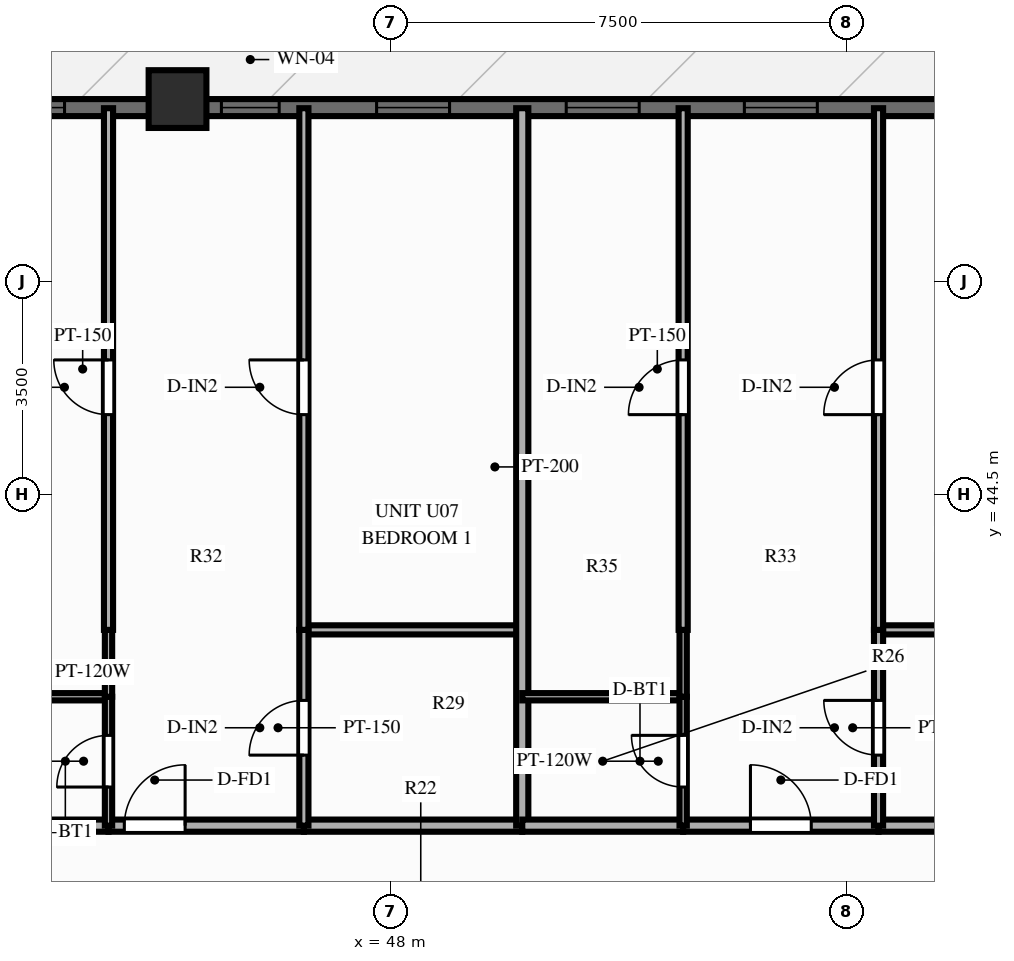
"""IFC4 building model, lengths in metres.
Left out: names, types, materials, properties, quantities, classifications, styles, units other than length and angle.
Written with IfcOpenShell. Run it as: python <this file> out.ifc"""

import sys

from ifc_helpers import new_model, si_unit, direction, frame, frame_2d, origin, origin_2d, place, context, subcontext, project, spatial, rectangle, extrude, source, transform, mapped, element, fill, save


model = new_model("IFC4")
c1 = context("Model", 3, precision=1e-05, world=origin(), true_north=direction((0.0, 1.0)))
c2 = subcontext(c1, "Body", "Model", "MODEL_VIEW")
j1 = project(units=[si_unit("LENGTHUNIT", "METRE"), si_unit("PLANEANGLEUNIT", "RADIAN")], contexts=[c1])
p1 = place(None, origin())
s1 = spatial("IfcSite", under=j1, at=p1, CompositionType="ELEMENT")
p2 = place(p1, origin())
s2 = spatial("IfcBuilding", under=s1, at=p2, CompositionType="ELEMENT")
p3 = place(p2, frame((0.0, 0.0, 86.85)))
s3 = spatial("IfcBuildingStorey", under=s2, at=p3, CompositionType="ELEMENT", Elevation=86.85)
m1 = source(origin(), c2, "Body", "SweptSolid", [
    extrude(rectangle(XDim=0.95, YDim=0.95, at=origin_2d()), origin(), (0.0, 0.0, 1.0), 3.0),
])
p4 = place(p3, frame((44.5, 51.0, 0.0), z_axis=(0.0, 0.0, 1.0), x_axis=(1.0, 0.0, 0.0)))
e1 = element("IfcColumn", 1, at=p4, inside=s3, PredefinedType="COLUMN", context=c2, shape_type="MappedRepresentation", body=[
    mapped(m1, transform((0.0, 0.0, 0.0), scale=1.0)),
])
p5 = place(p3, frame((16.2, 50.86, 0.0), z_axis=(0.0, 0.0, 1.0), x_axis=(1.0, 0.0, 0.0)))
e2 = element("IfcWall", 2, at=p5, inside=s3, PredefinedType="SOLIDWALL", context=c2, shape_type="SweptSolid", body=[
    extrude(rectangle(XDim=43.6, YDim=0.28, at=frame_2d((21.8, 0.0))), origin(), (0.0, 0.0, 1.0), 2.28),
])
p6 = place(p5, frame((0.722, 0.0, 0.25)))
e3 = element("IfcOpeningElement", 3, at=p6, cuts=e2, PredefinedType="OPENING", context=c2, shape_type="SweptSolid", body=[
    extrude(rectangle(XDim=1.2, YDim=1.5, at=frame_2d((0.6, 0.75))), frame((0.0, 0.152, 0.0), z_axis=(0.0, -1.0, 0.0), x_axis=(1.0, 0.0, 0.0)), (0.0, 0.0, 1.0), 0.304),
])
p7 = place(p5, frame((3.172, 0.0, 0.25)))
e4 = element("IfcOpeningElement", 4, at=p7, cuts=e2, PredefinedType="OPENING", context=c2, shape_type="SweptSolid", body=[
    extrude(rectangle(XDim=1.2, YDim=1.5, at=frame_2d((0.6, 0.75))), frame((0.0, 0.152, 0.0), z_axis=(0.0, -1.0, 0.0), x_axis=(1.0, 0.0, 0.0)), (0.0, 0.0, 1.0), 0.304),
])
p8 = place(p5, frame((6.944, 0.0, 0.25)))
e5 = element("IfcOpeningElement", 5, at=p8, cuts=e2, PredefinedType="OPENING", context=c2, shape_type="SweptSolid", body=[
    extrude(rectangle(XDim=1.2, YDim=1.5, at=frame_2d((0.6, 0.75))), frame((0.0, 0.152, 0.0), z_axis=(0.0, -1.0, 0.0), x_axis=(1.0, 0.0, 0.0)), (0.0, 0.0, 1.0), 0.304),
])
p9 = place(p5, frame((11.049, 0.0, 0.25)))
e6 = element("IfcOpeningElement", 6, at=p9, cuts=e2, PredefinedType="OPENING", context=c2, shape_type="SweptSolid", body=[
    extrude(rectangle(XDim=1.2, YDim=1.5, at=frame_2d((0.6, 0.75))), frame((0.0, 0.152, 0.0), z_axis=(0.0, -1.0, 0.0), x_axis=(1.0, 0.0, 0.0)), (0.0, 0.0, 1.0), 0.304),
])
p10 = place(p5, frame((13.73, 0.0, 0.25)))
e7 = element("IfcOpeningElement", 7, at=p10, cuts=e2, PredefinedType="OPENING", context=c2, shape_type="SweptSolid", body=[
    extrude(rectangle(XDim=0.95, YDim=1.5, at=frame_2d((0.475, 0.75))), frame((0.0, 0.152, 0.0), z_axis=(0.0, -1.0, 0.0), x_axis=(1.0, 0.0, 0.0)), (0.0, 0.0, 1.0), 0.304),
])
p11 = place(p5, frame((18.089, 0.0, 0.0)))
e8 = element("IfcOpeningElement", 8, at=p11, cuts=e2, PredefinedType="OPENING", context=c2, shape_type="SweptSolid", body=[
    extrude(rectangle(XDim=1.1, YDim=2.15, at=frame_2d((0.55, 1.075))), frame((0.0, 0.152, 0.0), z_axis=(0.0, -1.0, 0.0), x_axis=(1.0, 0.0, 0.0)), (0.0, 0.0, 1.0), 0.304),
])
p12 = place(p5, frame((22.144, 0.0, 0.25)))
e9 = element("IfcOpeningElement", 9, at=p12, cuts=e2, PredefinedType="OPENING", context=c2, shape_type="SweptSolid", body=[
    extrude(rectangle(XDim=1.2, YDim=1.5, at=frame_2d((0.6, 0.75))), frame((0.0, 0.152, 0.0), z_axis=(0.0, -1.0, 0.0), x_axis=(1.0, 0.0, 0.0)), (0.0, 0.0, 1.0), 0.304),
])
p13 = place(p5, frame((25.242, 0.0, 0.25)))
e10 = element("IfcOpeningElement", 10, at=p13, cuts=e2, PredefinedType="OPENING", context=c2, shape_type="SweptSolid", body=[
    extrude(rectangle(XDim=1.2, YDim=1.5, at=frame_2d((0.6, 0.75))), frame((0.0, 0.152, 0.0), z_axis=(0.0, -1.0, 0.0), x_axis=(1.0, 0.0, 0.0)), (0.0, 0.0, 1.0), 0.304),
])
p14 = place(p5, frame((29.021, 0.0, 0.25)))
e11 = element("IfcOpeningElement", 11, at=p14, cuts=e2, PredefinedType="OPENING", context=c2, shape_type="SweptSolid", body=[
    extrude(rectangle(XDim=0.95, YDim=1.5, at=frame_2d((0.475, 0.75))), frame((0.0, 0.152, 0.0), z_axis=(0.0, -1.0, 0.0), x_axis=(1.0, 0.0, 0.0)), (0.0, 0.0, 1.0), 0.304),
])
p15 = place(p5, frame((31.574, 0.0, 0.25)))
e12 = element("IfcOpeningElement", 12, at=p15, cuts=e2, PredefinedType="OPENING", context=c2, shape_type="SweptSolid", body=[
    extrude(rectangle(XDim=1.2, YDim=1.5, at=frame_2d((0.6, 0.75))), frame((0.0, 0.152, 0.0), z_axis=(0.0, -1.0, 0.0), x_axis=(1.0, 0.0, 0.0)), (0.0, 0.0, 1.0), 0.304),
])
p16 = place(p5, frame((34.692, 0.0, 0.25)))
e13 = element("IfcOpeningElement", 13, at=p16, cuts=e2, PredefinedType="OPENING", context=c2, shape_type="SweptSolid", body=[
    extrude(rectangle(XDim=1.2, YDim=1.5, at=frame_2d((0.6, 0.75))), frame((0.0, 0.152, 0.0), z_axis=(0.0, -1.0, 0.0), x_axis=(1.0, 0.0, 0.0)), (0.0, 0.0, 1.0), 0.304),
])
p17 = place(p5, frame((37.622, 0.0, 0.25)))
e14 = element("IfcOpeningElement", 14, at=p17, cuts=e2, PredefinedType="OPENING", context=c2, shape_type="SweptSolid", body=[
    extrude(rectangle(XDim=1.2, YDim=1.5, at=frame_2d((0.6, 0.75))), frame((0.0, 0.152, 0.0), z_axis=(0.0, -1.0, 0.0), x_axis=(1.0, 0.0, 0.0)), (0.0, 0.0, 1.0), 0.304),
])
p18 = place(p5, frame((40.957, 0.0, 0.25)))
e15 = element("IfcOpeningElement", 15, at=p18, cuts=e2, PredefinedType="OPENING", context=c2, shape_type="SweptSolid", body=[
    extrude(rectangle(XDim=1.2, YDim=1.5, at=frame_2d((0.6, 0.75))), frame((0.0, 0.152, 0.0), z_axis=(0.0, -1.0, 0.0), x_axis=(1.0, 0.0, 0.0)), (0.0, 0.0, 1.0), 0.304),
])
p19 = place(p3, frame((40.719, 39.05, 0.0), z_axis=(0.0, 0.0, 1.0), x_axis=(1.0, 0.0, 0.0)))
e16 = element("IfcWall", 16, at=p19, inside=s3, PredefinedType="PARTITIONING", context=c2, shape_type="SweptSolid", body=[
    extrude(rectangle(XDim=2.646, YDim=0.2, at=frame_2d((1.323, 0.0))), origin(), (0.0, 0.0, 1.0), 2.79),
])
p20 = place(p3, frame((43.365, 39.05, 0.0), z_axis=(0.0, 0.0, 1.0), x_axis=(1.0, 0.0, 0.0)))
e17 = element("IfcWall", 17, at=p20, inside=s3, PredefinedType="PARTITIONING", context=c2, shape_type="SweptSolid", body=[
    extrude(rectangle(XDim=3.213, YDim=0.2, at=frame_2d((1.606, 0.0))), origin(), (0.0, 0.0, 1.0), 2.79),
])
p21 = place(p20, frame((0.26, 0.0, 0.0)))
e18 = element("IfcOpeningElement", 18, at=p21, cuts=e17, PredefinedType="OPENING", context=c2, shape_type="SweptSolid", body=[
    extrude(rectangle(XDim=1.0, YDim=2.15, at=frame_2d((0.5, 1.075))), frame((0.0, 0.112, 0.0), z_axis=(0.0, -1.0, 0.0), x_axis=(1.0, 0.0, 0.0)), (0.0, 0.0, 1.0), 0.224),
])
p22 = place(p3, frame((46.578, 39.05, 0.0), z_axis=(0.0, 0.0, 1.0), x_axis=(1.0, 0.0, 0.0)))
e19 = element("IfcWall", 19, at=p22, inside=s3, PredefinedType="PARTITIONING", context=c2, shape_type="SweptSolid", body=[
    extrude(rectangle(XDim=3.591, YDim=0.2, at=frame_2d((1.796, 0.0))), origin(), (0.0, 0.0, 1.0), 2.79),
])
p23 = place(p3, frame((40.719, 41.17, 0.0), z_axis=(0.0, 0.0, 1.0), x_axis=(1.0, 0.0, 0.0)))
e20 = element("IfcWall", 20, at=p23, inside=s3, PredefinedType="PARTITIONING", context=c2, shape_type="SweptSolid", body=[
    extrude(rectangle(XDim=2.646, YDim=0.12, at=frame_2d((1.323, 0.0))), origin(), (0.0, 0.0, 1.0), 2.79),
])
p24 = place(p3, frame((46.578, 42.27, 0.0), z_axis=(0.0, 0.0, 1.0), x_axis=(1.0, 0.0, 0.0)))
e21 = element("IfcWall", 21, at=p24, inside=s3, PredefinedType="PARTITIONING", context=c2, shape_type="SweptSolid", body=[
    extrude(rectangle(XDim=3.591, YDim=0.15, at=frame_2d((1.796, 0.0))), origin(), (0.0, 0.0, 1.0), 2.79),
])
p25 = place(p3, frame((43.365, 39.05, 0.0), z_axis=(0.0, 0.0, 1.0), x_axis=(0.0, 1.0, 0.0)))
e22 = element("IfcWall", 22, at=p25, inside=s3, PredefinedType="PARTITIONING", context=c2, shape_type="SweptSolid", body=[
    extrude(rectangle(XDim=2.12, YDim=0.12, at=frame_2d((1.06, 0.0))), origin(), (0.0, 0.0, 1.0), 2.79),
])
p26 = place(p25, frame((0.635, 0.0, 0.0)))
e23 = element("IfcOpeningElement", 23, at=p26, cuts=e22, PredefinedType="OPENING", context=c2, shape_type="SweptSolid", body=[
    extrude(rectangle(XDim=0.85, YDim=2.05, at=frame_2d((0.425, 1.025))), frame((0.0, 0.072, 0.0), z_axis=(0.0, -1.0, 0.0), x_axis=(1.0, 0.0, 0.0)), (0.0, 0.0, 1.0), 0.144),
])
p27 = place(p3, frame((43.365, 41.17, 0.0), z_axis=(0.0, 0.0, 1.0), x_axis=(0.0, 1.0, 0.0)))
e24 = element("IfcWall", 24, at=p27, inside=s3, PredefinedType="PARTITIONING", context=c2, shape_type="SweptSolid", body=[
    extrude(rectangle(XDim=1.1, YDim=0.12, at=frame_2d((0.55, 0.0))), origin(), (0.0, 0.0, 1.0), 2.79),
])
p28 = place(p3, frame((43.365, 42.27, 0.0), z_axis=(0.0, 0.0, 1.0), x_axis=(0.0, 1.0, 0.0)))
e25 = element("IfcWall", 25, at=p28, inside=s3, PredefinedType="PARTITIONING", context=c2, shape_type="SweptSolid", body=[
    extrude(rectangle(XDim=8.58, YDim=0.15, at=frame_2d((4.29, 0.0))), origin(), (0.0, 0.0, 1.0), 2.79),
])
p29 = place(p28, frame((3.54, 0.0, 0.0)))
e26 = element("IfcOpeningElement", 26, at=p29, cuts=e25, PredefinedType="OPENING", context=c2, shape_type="SweptSolid", body=[
    extrude(rectangle(XDim=0.9, YDim=2.1, at=frame_2d((0.45, 1.05))), frame((0.0, 0.087, 0.0), z_axis=(0.0, -1.0, 0.0), x_axis=(1.0, 0.0, 0.0)), (0.0, 0.0, 1.0), 0.174),
])
p30 = place(p3, frame((46.578, 39.05, 0.0), z_axis=(0.0, 0.0, 1.0), x_axis=(0.0, 1.0, 0.0)))
e27 = element("IfcWall", 27, at=p30, inside=s3, PredefinedType="PARTITIONING", context=c2, shape_type="SweptSolid", body=[
    extrude(rectangle(XDim=3.22, YDim=0.15, at=frame_2d((1.61, 0.0))), origin(), (0.0, 0.0, 1.0), 2.79),
])
p31 = place(p30, frame((1.16, 0.0, 0.0)))
e28 = element("IfcOpeningElement", 28, at=p31, cuts=e27, PredefinedType="OPENING", context=c2, shape_type="SweptSolid", body=[
    extrude(rectangle(XDim=0.9, YDim=2.1, at=frame_2d((0.45, 1.05))), frame((0.0, 0.087, 0.0), z_axis=(0.0, -1.0, 0.0), x_axis=(1.0, 0.0, 0.0)), (0.0, 0.0, 1.0), 0.174),
])
p32 = place(p3, frame((46.578, 42.27, 0.0), z_axis=(0.0, 0.0, 1.0), x_axis=(0.0, 1.0, 0.0)))
e29 = element("IfcWall", 29, at=p32, inside=s3, PredefinedType="PARTITIONING", context=c2, shape_type="SweptSolid", body=[
    extrude(rectangle(XDim=8.58, YDim=0.15, at=frame_2d((4.29, 0.0))), origin(), (0.0, 0.0, 1.0), 2.79),
])
p33 = place(p32, frame((3.54, 0.0, 0.0)))
e30 = element("IfcOpeningElement", 30, at=p33, cuts=e29, PredefinedType="OPENING", context=c2, shape_type="SweptSolid", body=[
    extrude(rectangle(XDim=0.9, YDim=2.1, at=frame_2d((0.45, 1.05))), frame((0.0, 0.087, 0.0), z_axis=(0.0, -1.0, 0.0), x_axis=(1.0, 0.0, 0.0)), (0.0, 0.0, 1.0), 0.174),
])
p34 = place(p3, frame((50.169, 39.05, 0.0), z_axis=(0.0, 0.0, 1.0), x_axis=(0.0, 1.0, 0.0)))
e31 = element("IfcWall", 31, at=p34, inside=s3, PredefinedType="PARTITIONING", context=c2, shape_type="SweptSolid", body=[
    extrude(rectangle(XDim=11.8, YDim=0.2, at=frame_2d((5.9, 0.0))), origin(), (0.0, 0.0, 1.0), 2.79),
])
p35 = place(p3, frame((50.169, 39.05, 0.0), z_axis=(0.0, 0.0, 1.0), x_axis=(1.0, 0.0, 0.0)))
e32 = element("IfcWall", 32, at=p35, inside=s3, PredefinedType="PARTITIONING", context=c2, shape_type="SweptSolid", body=[
    extrude(rectangle(XDim=2.646, YDim=0.2, at=frame_2d((1.323, 0.0))), origin(), (0.0, 0.0, 1.0), 2.79),
])
p36 = place(p3, frame((52.815, 39.05, 0.0), z_axis=(0.0, 0.0, 1.0), x_axis=(1.0, 0.0, 0.0)))
e33 = element("IfcWall", 33, at=p36, inside=s3, PredefinedType="PARTITIONING", context=c2, shape_type="SweptSolid", body=[
    extrude(rectangle(XDim=3.213, YDim=0.2, at=frame_2d((1.607, 0.0))), origin(), (0.0, 0.0, 1.0), 2.79),
])
p37 = place(p36, frame((1.107, 0.0, 0.0)))
e34 = element("IfcOpeningElement", 34, at=p37, cuts=e33, PredefinedType="OPENING", context=c2, shape_type="SweptSolid", body=[
    extrude(rectangle(XDim=1.0, YDim=2.15, at=frame_2d((0.5, 1.075))), frame((0.0, 0.112, 0.0), z_axis=(0.0, -1.0, 0.0), x_axis=(1.0, 0.0, 0.0)), (0.0, 0.0, 1.0), 0.224),
])
p38 = place(p3, frame((56.029, 39.05, 0.0), z_axis=(0.0, 0.0, 1.0), x_axis=(1.0, 0.0, 0.0)))
e35 = element("IfcWall", 35, at=p38, inside=s3, PredefinedType="PARTITIONING", context=c2, shape_type="SweptSolid", body=[
    extrude(rectangle(XDim=3.591, YDim=0.2, at=frame_2d((1.796, 0.0))), origin(), (0.0, 0.0, 1.0), 2.79),
])
p39 = place(p3, frame((50.169, 41.17, 0.0), z_axis=(0.0, 0.0, 1.0), x_axis=(1.0, 0.0, 0.0)))
e36 = element("IfcWall", 36, at=p39, inside=s3, PredefinedType="PARTITIONING", context=c2, shape_type="SweptSolid", body=[
    extrude(rectangle(XDim=2.646, YDim=0.12, at=frame_2d((1.323, 0.0))), origin(), (0.0, 0.0, 1.0), 2.79),
])
p40 = place(p3, frame((56.029, 42.27, 0.0), z_axis=(0.0, 0.0, 1.0), x_axis=(1.0, 0.0, 0.0)))
e37 = element("IfcWall", 37, at=p40, inside=s3, PredefinedType="PARTITIONING", context=c2, shape_type="SweptSolid", body=[
    extrude(rectangle(XDim=3.591, YDim=0.15, at=frame_2d((1.796, 0.0))), origin(), (0.0, 0.0, 1.0), 2.79),
])
p41 = place(p3, frame((52.815, 39.05, 0.0), z_axis=(0.0, 0.0, 1.0), x_axis=(0.0, 1.0, 0.0)))
e38 = element("IfcWall", 38, at=p41, inside=s3, PredefinedType="PARTITIONING", context=c2, shape_type="SweptSolid", body=[
    extrude(rectangle(XDim=2.12, YDim=0.12, at=frame_2d((1.06, 0.0))), origin(), (0.0, 0.0, 1.0), 2.79),
])
p42 = place(p41, frame((0.635, 0.0, 0.0)))
e39 = element("IfcOpeningElement", 39, at=p42, cuts=e38, PredefinedType="OPENING", context=c2, shape_type="SweptSolid", body=[
    extrude(rectangle(XDim=0.85, YDim=2.05, at=frame_2d((0.425, 1.025))), frame((0.0, 0.072, 0.0), z_axis=(0.0, -1.0, 0.0), x_axis=(1.0, 0.0, 0.0)), (0.0, 0.0, 1.0), 0.144),
])
p43 = place(p3, frame((52.815, 41.17, 0.0), z_axis=(0.0, 0.0, 1.0), x_axis=(0.0, 1.0, 0.0)))
e40 = element("IfcWall", 40, at=p43, inside=s3, PredefinedType="PARTITIONING", context=c2, shape_type="SweptSolid", body=[
    extrude(rectangle(XDim=1.1, YDim=0.12, at=frame_2d((0.55, 0.0))), origin(), (0.0, 0.0, 1.0), 2.79),
])
p44 = place(p3, frame((52.815, 42.27, 0.0), z_axis=(0.0, 0.0, 1.0), x_axis=(0.0, 1.0, 0.0)))
e41 = element("IfcWall", 41, at=p44, inside=s3, PredefinedType="PARTITIONING", context=c2, shape_type="SweptSolid", body=[
    extrude(rectangle(XDim=8.58, YDim=0.15, at=frame_2d((4.29, 0.0))), origin(), (0.0, 0.0, 1.0), 2.79),
])
p45 = place(p44, frame((3.54, 0.0, 0.0)))
e42 = element("IfcOpeningElement", 42, at=p45, cuts=e41, PredefinedType="OPENING", context=c2, shape_type="SweptSolid", body=[
    extrude(rectangle(XDim=0.9, YDim=2.1, at=frame_2d((0.45, 1.05))), frame((0.0, 0.087, 0.0), z_axis=(0.0, -1.0, 0.0), x_axis=(1.0, 0.0, 0.0)), (0.0, 0.0, 1.0), 0.174),
])
p46 = place(p3, frame((56.029, 39.05, 0.0), z_axis=(0.0, 0.0, 1.0), x_axis=(0.0, 1.0, 0.0)))
e43 = element("IfcWall", 43, at=p46, inside=s3, PredefinedType="PARTITIONING", context=c2, shape_type="SweptSolid", body=[
    extrude(rectangle(XDim=3.22, YDim=0.15, at=frame_2d((1.61, 0.0))), origin(), (0.0, 0.0, 1.0), 2.79),
])
p47 = place(p46, frame((1.16, 0.0, 0.0)))
e44 = element("IfcOpeningElement", 44, at=p47, cuts=e43, PredefinedType="OPENING", context=c2, shape_type="SweptSolid", body=[
    extrude(rectangle(XDim=0.9, YDim=2.1, at=frame_2d((0.45, 1.05))), frame((0.0, 0.087, 0.0), z_axis=(0.0, -1.0, 0.0), x_axis=(1.0, 0.0, 0.0)), (0.0, 0.0, 1.0), 0.174),
])
p48 = place(p3, frame((56.029, 42.27, 0.0), z_axis=(0.0, 0.0, 1.0), x_axis=(0.0, 1.0, 0.0)))
e45 = element("IfcWall", 45, at=p48, inside=s3, PredefinedType="PARTITIONING", context=c2, shape_type="SweptSolid", body=[
    extrude(rectangle(XDim=8.58, YDim=0.15, at=frame_2d((4.29, 0.0))), origin(), (0.0, 0.0, 1.0), 2.79),
])
p49 = place(p48, frame((3.54, 0.0, 0.0)))
e46 = element("IfcOpeningElement", 46, at=p49, cuts=e45, PredefinedType="OPENING", context=c2, shape_type="SweptSolid", body=[
    extrude(rectangle(XDim=0.9, YDim=2.1, at=frame_2d((0.45, 1.05))), frame((0.0, 0.087, 0.0), z_axis=(0.0, -1.0, 0.0), x_axis=(1.0, 0.0, 0.0)), (0.0, 0.0, 1.0), 0.174),
])
m2 = source(origin(), c2, "Body", "SweptSolid", [
    extrude(rectangle(XDim=1.2, YDim=1.5, at=frame_2d((0.6, 0.75))), frame((0.0, 0.03, 0.0), z_axis=(0.0, -1.0, 0.0), x_axis=(1.0, 0.0, 0.0)), (0.0, 0.0, 1.0), 0.06),
])
p50 = place(p13, origin())
e47 = element("IfcWindow", 47, at=p50, inside=s3, PartitioningType="SINGLE_PANEL", PredefinedType="WINDOW", context=c2, shape_type="MappedRepresentation", body=[
    mapped(m2, transform((0.0, 0.0, 0.0), scale=1.0)),
])
fill(e10, e47)
m3 = source(origin(), c2, "Body", "SweptSolid", [
    extrude(rectangle(XDim=0.95, YDim=1.5, at=frame_2d((0.475, 0.75))), frame((0.0, 0.03, 0.0), z_axis=(0.0, -1.0, 0.0), x_axis=(1.0, 0.0, 0.0)), (0.0, 0.0, 1.0), 0.06),
])
p51 = place(p14, origin())
e48 = element("IfcWindow", 48, at=p51, inside=s3, PartitioningType="SINGLE_PANEL", PredefinedType="WINDOW", context=c2, shape_type="MappedRepresentation", body=[
    mapped(m3, transform((0.0, 0.0, 0.0), scale=1.0)),
])
fill(e11, e48)
p52 = place(p15, origin())
e49 = element("IfcWindow", 49, at=p52, inside=s3, PartitioningType="SINGLE_PANEL", PredefinedType="WINDOW", context=c2, shape_type="MappedRepresentation", body=[
    mapped(m2, transform((0.0, 0.0, 0.0), scale=1.0)),
])
fill(e12, e49)
p53 = place(p16, origin())
e50 = element("IfcWindow", 50, at=p53, inside=s3, PartitioningType="SINGLE_PANEL", PredefinedType="WINDOW", context=c2, shape_type="MappedRepresentation", body=[
    mapped(m2, transform((0.0, 0.0, 0.0), scale=1.0)),
])
fill(e13, e50)
p54 = place(p17, origin())
e51 = element("IfcWindow", 51, at=p54, inside=s3, PartitioningType="SINGLE_PANEL", PredefinedType="WINDOW", context=c2, shape_type="MappedRepresentation", body=[
    mapped(m2, transform((0.0, 0.0, 0.0), scale=1.0)),
])
fill(e14, e51)
m4 = source(origin(), c2, "Body", "SweptSolid", [
    extrude(rectangle(XDim=1.0, YDim=2.15, at=frame_2d((0.5, 1.075))), frame((0.0, 0.025, 0.0), z_axis=(0.0, -1.0, 0.0), x_axis=(1.0, 0.0, 0.0)), (0.0, 0.0, 1.0), 0.05),
])
p55 = place(p21, origin())
e52 = element("IfcDoor", 52, at=p55, inside=s3, OperationType="SINGLE_SWING_RIGHT", PredefinedType="DOOR", context=c2, shape_type="MappedRepresentation", body=[
    mapped(m4, transform((0.0, 0.0, 0.0), scale=1.0)),
])
fill(e18, e52)
m5 = source(origin(), c2, "Body", "SweptSolid", [
    extrude(rectangle(XDim=0.85, YDim=2.05, at=frame_2d((0.425, 1.025))), frame((0.0, 0.025, 0.0), z_axis=(0.0, -1.0, 0.0), x_axis=(1.0, 0.0, 0.0)), (0.0, 0.0, 1.0), 0.05),
])
p56 = place(p26, origin())
e53 = element("IfcDoor", 53, at=p56, inside=s3, OperationType="SINGLE_SWING_LEFT", PredefinedType="DOOR", context=c2, shape_type="MappedRepresentation", body=[
    mapped(m5, transform((0.0, 0.0, 0.0), scale=1.0)),
])
fill(e23, e53)
m6 = source(origin(), c2, "Body", "SweptSolid", [
    extrude(rectangle(XDim=0.9, YDim=2.1, at=frame_2d((0.45, 1.05))), frame((0.0, 0.025, 0.0), z_axis=(0.0, -1.0, 0.0), x_axis=(1.0, 0.0, 0.0)), (0.0, 0.0, 1.0), 0.05),
])
p57 = place(p29, origin())
e54 = element("IfcDoor", 54, at=p57, inside=s3, OperationType="SINGLE_SWING_RIGHT", PredefinedType="DOOR", context=c2, shape_type="MappedRepresentation", body=[
    mapped(m6, transform((0.0, 0.0, 0.0), scale=1.0)),
])
fill(e26, e54)
p58 = place(p31, origin())
e55 = element("IfcDoor", 55, at=p58, inside=s3, OperationType="SINGLE_SWING_LEFT", PredefinedType="DOOR", context=c2, shape_type="MappedRepresentation", body=[
    mapped(m6, transform((0.0, 0.0, 0.0), scale=1.0)),
])
fill(e28, e55)
p59 = place(p33, origin())
e56 = element("IfcDoor", 56, at=p59, inside=s3, OperationType="SINGLE_SWING_RIGHT", PredefinedType="DOOR", context=c2, shape_type="MappedRepresentation", body=[
    mapped(m6, transform((0.0, 0.0, 0.0), scale=1.0)),
])
fill(e30, e56)
p60 = place(p37, origin())
e57 = element("IfcDoor", 57, at=p60, inside=s3, OperationType="SINGLE_SWING_LEFT", PredefinedType="DOOR", context=c2, shape_type="MappedRepresentation", body=[
    mapped(m4, transform((0.0, 0.0, 0.0), scale=1.0)),
])
fill(e34, e57)
p61 = place(p42, origin())
e58 = element("IfcDoor", 58, at=p61, inside=s3, OperationType="SINGLE_SWING_RIGHT", PredefinedType="DOOR", context=c2, shape_type="MappedRepresentation", body=[
    mapped(m5, transform((0.0, 0.0, 0.0), scale=1.0)),
])
fill(e39, e58)
p62 = place(p45, origin())
e59 = element("IfcDoor", 59, at=p62, inside=s3, OperationType="SINGLE_SWING_LEFT", PredefinedType="DOOR", context=c2, shape_type="MappedRepresentation", body=[
    mapped(m6, transform((0.0, 0.0, 0.0), scale=1.0)),
])
fill(e42, e59)
p63 = place(p47, origin())
e60 = element("IfcDoor", 60, at=p63, inside=s3, OperationType="SINGLE_SWING_RIGHT", PredefinedType="DOOR", context=c2, shape_type="MappedRepresentation", body=[
    mapped(m6, transform((0.0, 0.0, 0.0), scale=1.0)),
])
fill(e44, e60)
p64 = place(p49, origin())
e61 = element("IfcDoor", 61, at=p64, inside=s3, OperationType="SINGLE_SWING_LEFT", PredefinedType="DOOR", context=c2, shape_type="MappedRepresentation", body=[
    mapped(m6, transform((0.0, 0.0, 0.0), scale=1.0)),
])
fill(e46, e61)
save(model, sys.argv[1])
